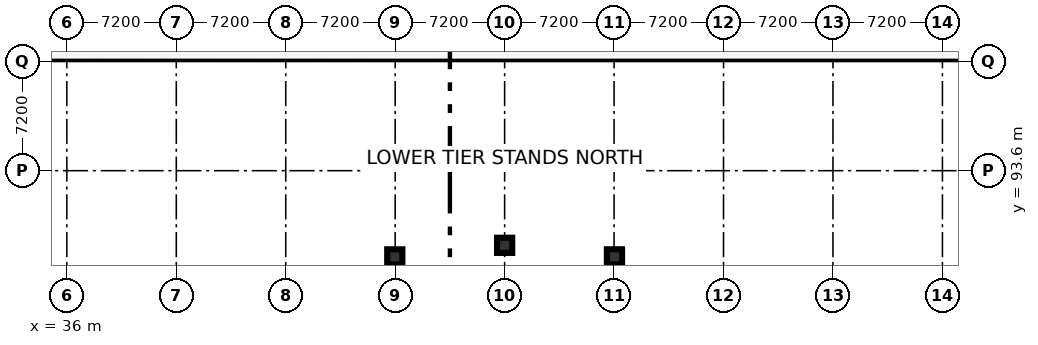
"""IFC4 building model, lengths in metres.
Left out: names, types, materials, properties, quantities, classifications, styles, units other than length and angle.
Written with IfcOpenShell. Run it as: python <this file> out.ifc"""

import sys

from ifc_helpers import new_model, si_unit, direction, frame, origin, origin_2d, place, context, subcontext, project, spatial, circle, extrude, element, save


model = new_model("IFC4")
c1 = context("Model", 3, precision=1e-05, world=origin(), true_north=direction((0.0, 1.0)))
c2 = subcontext(c1, "Body", "Model", "MODEL_VIEW")
j1 = project(units=[si_unit("LENGTHUNIT", "METRE"), si_unit("PLANEANGLEUNIT", "RADIAN")], contexts=[c1])
p1 = place(None, origin())
s1 = spatial("IfcSite", under=j1, at=p1, CompositionType="ELEMENT")
p2 = place(p1, origin())
s2 = spatial("IfcBuilding", under=s1, at=p2, CompositionType="ELEMENT")
p3 = place(p2, origin())
s3 = spatial("IfcBuildingStorey", under=s2, at=p3, CompositionType="ELEMENT", Elevation=0.0)
for number, where, z_axis, x_axis in (
    (1, (72.026, 87.93, 0.0), (0.0, 0.0, 1.0), (1.0, 0.0, 0.0)),
    (2, (64.8, 88.691, 0.0), (0.0, 0.0, 1.0), (1.0, 0.0, 0.0)),
    (3, (57.574, 87.93, 0.0), (0.0, 0.0, 1.0), (1.0, 0.0, 0.0)),
):
    element("IfcColumn", number, at=place(p3, frame(where, z_axis=z_axis, x_axis=x_axis)), inside=s3, PredefinedType="COLUMN", context=c2, shape_type="SweptSolid", body=[
        extrude(circle(Radius=0.5, at=origin_2d()), origin(), (0.0, 0.0, 1.0), 5.4),
    ])
save(model, sys.argv[1])
